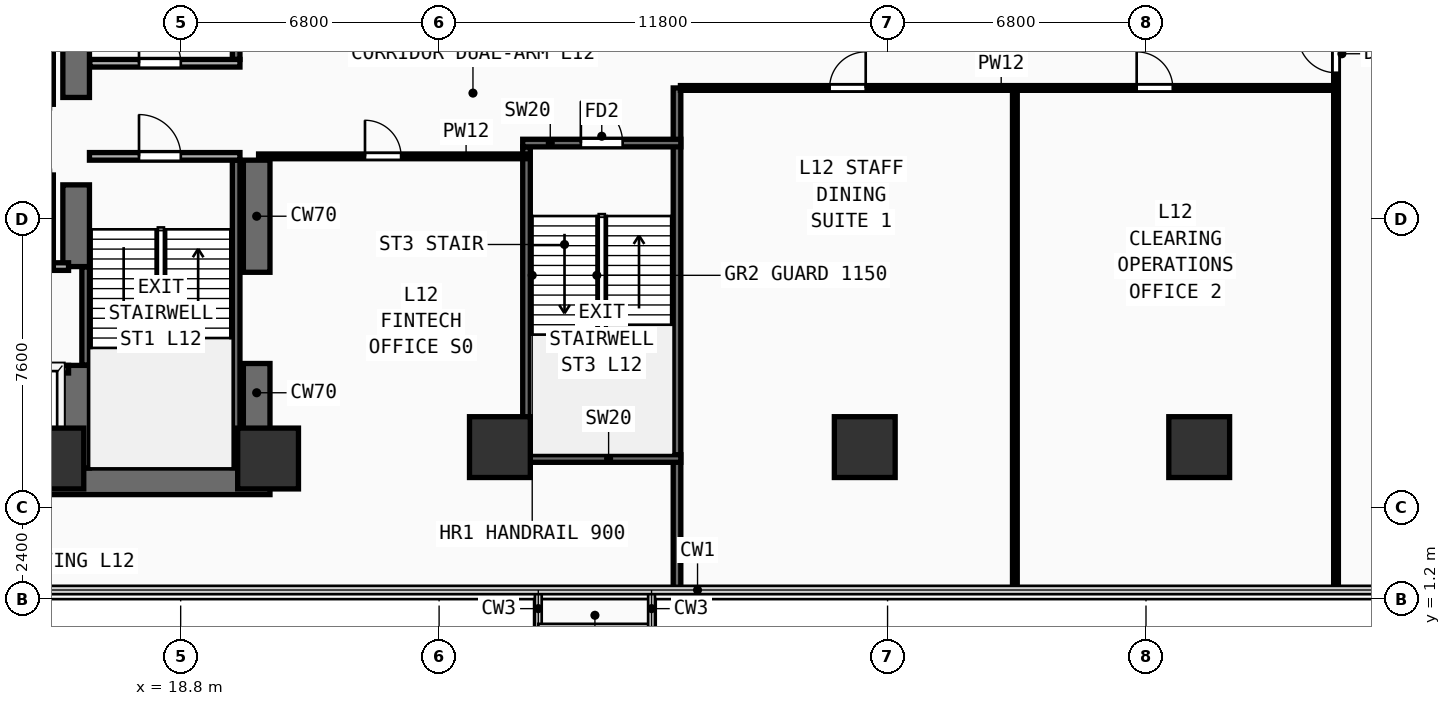
"""IFC4 building model, lengths in metres.
Left out: names, types, materials, properties, quantities, classifications, styles, units other than length and angle.
Written with IfcOpenShell. Run it as: python <this file> out.ifc"""

import sys

from ifc_helpers import new_model, si_unit, direction, frame, frame_2d, origin, origin_2d, place, context, subcontext, project, spatial, rectangle, extrude, element, fill, save


model = new_model("IFC4")
c1 = context("Model", 3, precision=1e-05, world=origin(), true_north=direction((0.0, 1.0)))
c2 = subcontext(c1, "Body", "Model", "MODEL_VIEW")
j1 = project(units=[si_unit("LENGTHUNIT", "METRE"), si_unit("PLANEANGLEUNIT", "RADIAN")], contexts=[c1])
p1 = place(None, origin())
s1 = spatial("IfcSite", under=j1, at=p1, CompositionType="ELEMENT")
p2 = place(p1, origin())
s2 = spatial("IfcBuilding", under=s1, at=p2, CompositionType="ELEMENT")
p3 = place(p2, frame((0.0, 0.0, 48.6)))
s3 = spatial("IfcBuildingStorey", under=s2, at=p3, CompositionType="ELEMENT", Elevation=48.6)
p4 = place(p3, frame((7.1, 4.3, 0.0), z_axis=(0.0, 0.0, 1.0), x_axis=(1.0, 0.0, 0.0)))
e1 = element("IfcWall", 1, at=p4, inside=s3, PredefinedType="SHEAR", context=c2, shape_type="SweptSolid", body=[
    extrude(rectangle(XDim=14.05, YDim=0.7, at=frame_2d((7.025, 0.0))), origin(), (0.0, 0.0, 1.0), 3.54),
])
p5 = place(p3, frame((20.8, 4.65, 0.0), z_axis=(0.0, 0.0, 1.0), x_axis=(0.0, 1.0, 0.0)))
e2 = element("IfcWall", 2, at=p5, inside=s3, PredefinedType="SHEAR", context=c2, shape_type="SweptSolid", body=[
    extrude(rectangle(XDim=2.75, YDim=0.7, at=frame_2d((1.375, 0.0))), origin(), (0.0, 0.0, 1.0), 3.54),
])
p6 = place(p3, frame((20.8, 9.8, 0.0), z_axis=(0.0, 0.0, 1.0), x_axis=(0.0, 1.0, 0.0)))
e3 = element("IfcWall", 3, at=p6, inside=s3, PredefinedType="SHEAR", context=c2, shape_type="SweptSolid", body=[
    extrude(rectangle(XDim=2.95, YDim=0.7, at=frame_2d((1.475, 0.0))), origin(), (0.0, 0.0, 1.0), 3.54),
])
p7 = place(p3, frame((16.05, 4.65, 0.0), z_axis=(0.0, 0.0, 1.0), x_axis=(0.0, 1.0, 0.0)))
e4 = element("IfcWall", 4, at=p7, inside=s3, PredefinedType="SHEAR", context=c2, shape_type="SweptSolid", body=[
    extrude(rectangle(XDim=2.7, YDim=0.7, at=frame_2d((1.35, 0.0))), origin(), (0.0, 0.0, 1.0), 3.54),
])
p8 = place(p3, frame((16.05, 9.95, 0.0), z_axis=(0.0, 0.0, 1.0), x_axis=(0.0, 1.0, 0.0)))
e5 = element("IfcWall", 5, at=p8, inside=s3, PredefinedType="SHEAR", context=c2, shape_type="SweptSolid", body=[
    extrude(rectangle(XDim=2.15, YDim=0.7, at=frame_2d((1.075, 0.0))), origin(), (0.0, 0.0, 1.0), 3.54),
])
p9 = place(p3, frame((16.05, 14.4, 0.0), z_axis=(0.0, 0.0, 1.0), x_axis=(0.0, 1.0, 0.0)))
e6 = element("IfcWall", 6, at=p9, inside=s3, PredefinedType="SHEAR", context=c2, shape_type="SweptSolid", body=[
    extrude(rectangle(XDim=9.1, YDim=0.7, at=frame_2d((4.55, 0.0))), origin(), (0.0, 0.0, 1.0), 3.54),
])
for number, where, z_axis, x_axis in (
    (7, (15.45, 4.9, 0.0), (0.0, 0.0, 1.0), (1.0, 0.0, 0.0)),
    (8, (21.1, 4.9, 0.0), (0.0, 0.0, 1.0), (1.0, 0.0, 0.0)),
    (9, (27.2, 5.2, 0.0), (0.0, 0.0, 1.0), (1.0, 0.0, 0.0)),
    (10, (36.8, 5.2, 0.0), (0.0, 0.0, 1.0), (1.0, 0.0, 0.0)),
    (11, (45.6, 5.2, 0.0), (0.0, 0.0, 1.0), (1.0, 0.0, 0.0)),
):
    element("IfcColumn", number, at=place(p3, frame(where, z_axis=z_axis, x_axis=x_axis)), inside=s3, PredefinedType="COLUMN", context=c2, shape_type="SweptSolid", body=[
        extrude(rectangle(XDim=1.6, YDim=1.6, at=origin_2d()), origin(), (0.0, 0.0, 1.0), 3.54),
    ])
p10 = place(p3, frame((16.3, 7.36, 0.0), z_axis=(0.0, 0.0, 1.0), x_axis=(0.0, 1.0, 0.0)))
e12 = element("IfcWall", 12, at=p10, inside=s3, PredefinedType="SHEAR", context=c2, shape_type="SweptSolid", body=[
    extrude(rectangle(XDim=2.58, YDim=0.2, at=frame_2d((1.29, 0.0))), origin(), (0.0, 0.0, 1.0), 3.54),
])
p11 = place(p3, frame((20.26, 4.66, 0.0), z_axis=(0.0, 0.0, 1.0), x_axis=(0.0, 1.0, 0.0)))
e13 = element("IfcWall", 13, at=p11, inside=s3, PredefinedType="SHEAR", context=c2, shape_type="SweptSolid", body=[
    extrude(rectangle(XDim=8.09, YDim=0.2, at=frame_2d((4.045, 0.0))), origin(), (0.0, 0.0, 1.0), 3.54),
])
p12 = place(p3, frame((16.4, 12.85, 0.0), z_axis=(0.0, 0.0, 1.0), x_axis=(1.0, 0.0, 0.0)))
e14 = element("IfcWall", 14, at=p12, inside=s3, PredefinedType="PARTITIONING", context=c2, shape_type="SweptSolid", body=[
    extrude(rectangle(XDim=3.96, YDim=0.2, at=frame_2d((1.98, 0.0))), origin(), (0.0, 0.0, 1.0), 3.54),
])
p13 = place(p12, frame((1.304, 0.0, 0.0)))
e15 = element("IfcOpeningElement", 15, at=p13, cuts=e14, PredefinedType="OPENING", context=c2, shape_type="SweptSolid", body=[
    extrude(rectangle(XDim=1.1, YDim=2.2, at=frame_2d((0.55, 1.1))), frame((0.0, 0.11, 0.0), z_axis=(0.0, -1.0, 0.0), x_axis=(1.0, 0.0, 0.0)), (0.0, 0.0, 1.0), 0.22),
])
p14 = place(p3, frame((20.26, 15.4, 0.0), z_axis=(0.0, 0.0, 1.0), x_axis=(0.0, 1.0, 0.0)))
e16 = element("IfcWall", 16, at=p14, inside=s3, PredefinedType="SHEAR", context=c2, shape_type="SweptSolid", body=[
    extrude(rectangle(XDim=8.09, YDim=0.2, at=frame_2d((4.045, 0.0))), origin(), (0.0, 0.0, 1.0), 3.54),
])
p15 = place(p3, frame((16.41, 15.3, 0.0), z_axis=(0.0, 0.0, 1.0), x_axis=(1.0, 0.0, 0.0)))
e17 = element("IfcWall", 17, at=p15, inside=s3, PredefinedType="PARTITIONING", context=c2, shape_type="SweptSolid", body=[
    extrude(rectangle(XDim=3.95, YDim=0.2, at=frame_2d((1.975, 0.0))), origin(), (0.0, 0.0, 1.0), 3.54),
])
p16 = place(p15, frame((1.294, 0.0, 0.0)))
e18 = element("IfcOpeningElement", 18, at=p16, cuts=e17, PredefinedType="OPENING", context=c2, shape_type="SweptSolid", body=[
    extrude(rectangle(XDim=1.1, YDim=2.2, at=frame_2d((0.55, 1.1))), frame((0.0, 0.11, 0.0), z_axis=(0.0, -1.0, 0.0), x_axis=(1.0, 0.0, 0.0)), (0.0, 0.0, 1.0), 0.22),
])
p17 = place(p3, frame((27.9, 5.0, 0.0), z_axis=(0.0, 0.0, 1.0), x_axis=(0.0, 1.0, 0.0)))
e19 = element("IfcWall", 19, at=p17, inside=s3, PredefinedType="SHEAR", context=c2, shape_type="SweptSolid", body=[
    extrude(rectangle(XDim=8.1, YDim=0.2, at=frame_2d((4.05, 0.0))), origin(), (0.0, 0.0, 1.0), 3.54),
])
p18 = place(p3, frame((31.86, 1.44, 0.0), z_axis=(0.0, 0.0, 1.0), x_axis=(0.0, 1.0, 0.0)))
e20 = element("IfcWall", 20, at=p18, inside=s3, PredefinedType="SHEAR", context=c2, shape_type="SweptSolid", body=[
    extrude(rectangle(XDim=13.21, YDim=0.2, at=frame_2d((6.605, 0.0))), origin(), (0.0, 0.0, 1.0), 3.54),
])
p19 = place(p3, frame((27.8, 4.9, 0.0), z_axis=(0.0, 0.0, 1.0), x_axis=(1.0, 0.0, 0.0)))
e21 = element("IfcWall", 21, at=p19, inside=s3, PredefinedType="SHEAR", context=c2, shape_type="SweptSolid", body=[
    extrude(rectangle(XDim=4.16, YDim=0.2, at=frame_2d((2.08, 0.0))), origin(), (0.0, 0.0, 1.0), 3.54),
])
p20 = place(p3, frame((27.8, 13.2, 0.0), z_axis=(0.0, 0.0, 1.0), x_axis=(1.0, 0.0, 0.0)))
e22 = element("IfcWall", 22, at=p20, inside=s3, PredefinedType="SHEAR", context=c2, shape_type="SweptSolid", body=[
    extrude(rectangle(XDim=4.16, YDim=0.2, at=frame_2d((2.08, 0.0))), origin(), (0.0, 0.0, 1.0), 3.54),
])
p21 = place(p20, frame((1.53, 0.0, 0.0)))
e23 = element("IfcOpeningElement", 23, at=p21, cuts=e22, PredefinedType="OPENING", context=c2, shape_type="SweptSolid", body=[
    extrude(rectangle(XDim=1.1, YDim=2.2, at=frame_2d((0.55, 1.1))), frame((0.0, 0.11, 0.0), z_axis=(0.0, -1.0, 0.0), x_axis=(1.0, 0.0, 0.0)), (0.0, 0.0, 1.0), 0.22),
])
p22 = place(p3, frame((7.5, 7.25, 0.0), z_axis=(0.0, 0.0, 1.0), x_axis=(1.0, 0.0, 0.0)))
e24 = element("IfcWall", 24, at=p22, inside=s3, PredefinedType="PARTITIONING", context=c2, shape_type="SweptSolid", body=[
    extrude(rectangle(XDim=8.35, YDim=0.2, at=frame_2d((4.175, 0.0))), origin(), (0.0, 0.0, 1.0), 3.54),
])
p23 = place(p22, frame((0.53, 0.0, 0.0)))
e25 = element("IfcOpeningElement", 25, at=p23, cuts=e24, PredefinedType="OPENING", context=c2, shape_type="SweptSolid", body=[
    extrude(rectangle(XDim=1.1, YDim=2.2, at=frame_2d((0.55, 1.1))), frame((0.0, 0.11, 0.0), z_axis=(0.0, -1.0, 0.0), x_axis=(1.0, 0.0, 0.0)), (0.0, 0.0, 1.0), 0.22),
])
p24 = place(p22, frame((2.37, 0.0, 0.0)))
e26 = element("IfcOpeningElement", 26, at=p24, cuts=e24, PredefinedType="OPENING", context=c2, shape_type="SweptSolid", body=[
    extrude(rectangle(XDim=1.1, YDim=2.2, at=frame_2d((0.55, 1.1))), frame((0.0, 0.11, 0.0), z_axis=(0.0, -1.0, 0.0), x_axis=(1.0, 0.0, 0.0)), (0.0, 0.0, 1.0), 0.22),
])
p25 = place(p22, frame((4.33, 0.0, 0.0)))
e27 = element("IfcOpeningElement", 27, at=p25, cuts=e24, PredefinedType="OPENING", context=c2, shape_type="SweptSolid", body=[
    extrude(rectangle(XDim=1.1, YDim=2.2, at=frame_2d((0.55, 1.1))), frame((0.0, 0.11, 0.0), z_axis=(0.0, -1.0, 0.0), x_axis=(1.0, 0.0, 0.0)), (0.0, 0.0, 1.0), 0.22),
])
p26 = place(p22, frame((6.5, 0.0, 0.0)))
e28 = element("IfcOpeningElement", 28, at=p26, cuts=e24, PredefinedType="OPENING", context=c2, shape_type="SweptSolid", body=[
    extrude(rectangle(XDim=1.1, YDim=2.2, at=frame_2d((0.55, 1.1))), frame((0.0, 0.11, 0.0), z_axis=(0.0, -1.0, 0.0), x_axis=(1.0, 0.0, 0.0)), (0.0, 0.0, 1.0), 0.22),
])
p27 = place(p3, frame((7.5, 9.95, 0.0), z_axis=(0.0, 0.0, 1.0), x_axis=(1.0, 0.0, 0.0)))
e29 = element("IfcWall", 29, at=p27, inside=s3, PredefinedType="PARTITIONING", context=c2, shape_type="SweptSolid", body=[
    extrude(rectangle(XDim=8.35, YDim=0.2, at=frame_2d((4.175, 0.0))), origin(), (0.0, 0.0, 1.0), 3.54),
])
p28 = place(p3, frame((15.35, 9.95, 0.0), z_axis=(0.0, 0.0, 1.0), x_axis=(0.0, 1.0, 0.0)))
e30 = element("IfcWall", 30, at=p28, inside=s3, PredefinedType="PARTITIONING", context=c2, shape_type="SweptSolid", body=[
    extrude(rectangle(XDim=2.41, YDim=0.2, at=frame_2d((1.205, 0.0))), origin(), (0.0, 0.0, 1.0), 3.54),
])
p29 = place(p3, frame((15.35, 14.22, 0.0), z_axis=(0.0, 0.0, 1.0), x_axis=(0.0, 1.0, 0.0)))
e31 = element("IfcWall", 31, at=p29, inside=s3, PredefinedType="PARTITIONING", context=c2, shape_type="SweptSolid", body=[
    extrude(rectangle(XDim=2.23, YDim=0.2, at=frame_2d((1.115, 0.0))), origin(), (0.0, 0.0, 1.0), 3.54),
])
p30 = place(p3, frame((20.85, 12.85, 0.0), z_axis=(0.0, 0.0, 1.0), x_axis=(1.0, 0.0, 0.0)))
e32 = element("IfcWall", 32, at=p30, inside=s3, PredefinedType="PARTITIONING", context=c2, shape_type="SweptSolid", body=[
    extrude(rectangle(XDim=7.05, YDim=0.125, at=frame_2d((3.525, 0.0))), origin(), (0.0, 0.0, 1.0), 3.54),
])
p31 = place(p30, frame((2.8, 0.0, 0.0)))
e33 = element("IfcOpeningElement", 33, at=p31, cuts=e32, PredefinedType="OPENING", context=c2, shape_type="SweptSolid", body=[
    extrude(rectangle(XDim=0.95, YDim=2.15, at=frame_2d((0.475, 1.075))), frame((0.0, 0.073, 0.0), z_axis=(0.0, -1.0, 0.0), x_axis=(1.0, 0.0, 0.0)), (0.0, 0.0, 1.0), 0.145),
])
p32 = place(p3, frame((31.95, 14.65, 0.0), z_axis=(0.0, 0.0, 1.0), x_axis=(1.0, 0.0, 0.0)))
e34 = element("IfcWall", 34, at=p32, inside=s3, PredefinedType="PARTITIONING", context=c2, shape_type="SweptSolid", body=[
    extrude(rectangle(XDim=17.25, YDim=0.125, at=frame_2d((8.625, 0.0))), origin(), (0.0, 0.0, 1.0), 3.54),
])
p33 = place(p32, frame((3.925, 0.0, 0.0)))
e35 = element("IfcOpeningElement", 35, at=p33, cuts=e34, PredefinedType="OPENING", context=c2, shape_type="SweptSolid", body=[
    extrude(rectangle(XDim=0.95, YDim=2.15, at=frame_2d((0.475, 1.075))), frame((0.0, 0.073, 0.0), z_axis=(0.0, -1.0, 0.0), x_axis=(1.0, 0.0, 0.0)), (0.0, 0.0, 1.0), 0.145),
])
p34 = place(p32, frame((12.005, 0.0, 0.0)))
e36 = element("IfcOpeningElement", 36, at=p34, cuts=e34, PredefinedType="OPENING", context=c2, shape_type="SweptSolid", body=[
    extrude(rectangle(XDim=0.95, YDim=2.15, at=frame_2d((0.475, 1.075))), frame((0.0, 0.073, 0.0), z_axis=(0.0, -1.0, 0.0), x_axis=(1.0, 0.0, 0.0)), (0.0, 0.0, 1.0), 0.145),
])
p35 = place(p3, frame((40.75, 1.44, 0.0), z_axis=(0.0, 0.0, 1.0), x_axis=(0.0, 1.0, 0.0)))
e37 = element("IfcWall", 37, at=p35, inside=s3, PredefinedType="PARTITIONING", context=c2, shape_type="SweptSolid", body=[
    extrude(rectangle(XDim=13.21, YDim=0.125, at=frame_2d((6.605, 0.0))), origin(), (0.0, 0.0, 1.0), 3.54),
])
p36 = place(p3, frame((49.2, 1.44, 0.0), z_axis=(0.0, 0.0, 1.0), x_axis=(0.0, 1.0, 0.0)))
e38 = element("IfcWall", 38, at=p36, inside=s3, PredefinedType="PARTITIONING", context=c2, shape_type="SweptSolid", body=[
    extrude(rectangle(XDim=22.12, YDim=0.125, at=frame_2d((11.06, 0.0))), origin(), (0.0, 0.0, 1.0), 3.54),
])
p37 = place(p36, frame((13.61, 0.0, 0.0)))
e39 = element("IfcOpeningElement", 39, at=p37, cuts=e38, PredefinedType="OPENING", context=c2, shape_type="SweptSolid", body=[
    extrude(rectangle(XDim=1.0, YDim=2.2, at=frame_2d((0.5, 1.1))), frame((0.0, 0.073, 0.0), z_axis=(0.0, -1.0, 0.0), x_axis=(1.0, 0.0, 0.0)), (0.0, 0.0, 1.0), 0.145),
])
p38 = place(p13, frame((1.1, 0.0, 0.0), z_axis=(0.0, 0.0, 1.0), x_axis=(-1.0, 0.0, 0.0)))
e40 = element("IfcDoor", 40, at=p38, inside=s3, OperationType="SINGLE_SWING_RIGHT", PredefinedType="DOOR", context=c2, shape_type="SweptSolid", body=[
    extrude(rectangle(XDim=1.1, YDim=2.2, at=frame_2d((0.55, 1.1))), frame((0.0, 0.025, 0.0), z_axis=(0.0, -1.0, 0.0), x_axis=(1.0, 0.0, 0.0)), (0.0, 0.0, 1.0), 0.05),
])
fill(e15, e40)
p39 = place(p16, origin())
e41 = element("IfcDoor", 41, at=p39, inside=s3, OperationType="SINGLE_SWING_LEFT", PredefinedType="DOOR", context=c2, shape_type="SweptSolid", body=[
    extrude(rectangle(XDim=1.1, YDim=2.2, at=frame_2d((0.55, 1.1))), frame((0.0, 0.025, 0.0), z_axis=(0.0, -1.0, 0.0), x_axis=(1.0, 0.0, 0.0)), (0.0, 0.0, 1.0), 0.05),
])
fill(e18, e41)
p40 = place(p21, frame((1.1, 0.0, 0.0), z_axis=(0.0, 0.0, 1.0), x_axis=(-1.0, 0.0, 0.0)))
e42 = element("IfcDoor", 42, at=p40, inside=s3, OperationType="SINGLE_SWING_RIGHT", PredefinedType="DOOR", context=c2, shape_type="SweptSolid", body=[
    extrude(rectangle(XDim=1.1, YDim=2.2, at=frame_2d((0.55, 1.1))), frame((0.0, 0.025, 0.0), z_axis=(0.0, -1.0, 0.0), x_axis=(1.0, 0.0, 0.0)), (0.0, 0.0, 1.0), 0.05),
])
fill(e23, e42)
p41 = place(p31, origin())
e43 = element("IfcDoor", 43, at=p41, inside=s3, OperationType="SINGLE_SWING_LEFT", PredefinedType="DOOR", context=c2, shape_type="SweptSolid", body=[
    extrude(rectangle(XDim=0.95, YDim=2.15, at=frame_2d((0.475, 1.075))), frame((0.0, 0.025, 0.0), z_axis=(0.0, -1.0, 0.0), x_axis=(1.0, 0.0, 0.0)), (0.0, 0.0, 1.0), 0.05),
])
fill(e33, e43)
p42 = place(p33, origin())
e44 = element("IfcDoor", 44, at=p42, inside=s3, OperationType="SINGLE_SWING_RIGHT", PredefinedType="DOOR", context=c2, shape_type="SweptSolid", body=[
    extrude(rectangle(XDim=0.95, YDim=2.15, at=frame_2d((0.475, 1.075))), frame((0.0, 0.025, 0.0), z_axis=(0.0, -1.0, 0.0), x_axis=(1.0, 0.0, 0.0)), (0.0, 0.0, 1.0), 0.05),
])
fill(e35, e44)
p43 = place(p34, origin())
e45 = element("IfcDoor", 45, at=p43, inside=s3, OperationType="SINGLE_SWING_LEFT", PredefinedType="DOOR", context=c2, shape_type="SweptSolid", body=[
    extrude(rectangle(XDim=0.95, YDim=2.15, at=frame_2d((0.475, 1.075))), frame((0.0, 0.025, 0.0), z_axis=(0.0, -1.0, 0.0), x_axis=(1.0, 0.0, 0.0)), (0.0, 0.0, 1.0), 0.05),
])
fill(e36, e45)
p44 = place(p37, origin())
e46 = element("IfcDoor", 46, at=p44, inside=s3, OperationType="SINGLE_SWING_RIGHT", PredefinedType="DOOR", context=c2, shape_type="SweptSolid", body=[
    extrude(rectangle(XDim=1.0, YDim=2.2, at=frame_2d((0.5, 1.1))), frame((0.0, 0.025, 0.0), z_axis=(0.0, -1.0, 0.0), x_axis=(1.0, 0.0, 0.0)), (0.0, 0.0, 1.0), 0.05),
])
fill(e39, e46)
save(model, sys.argv[1])
